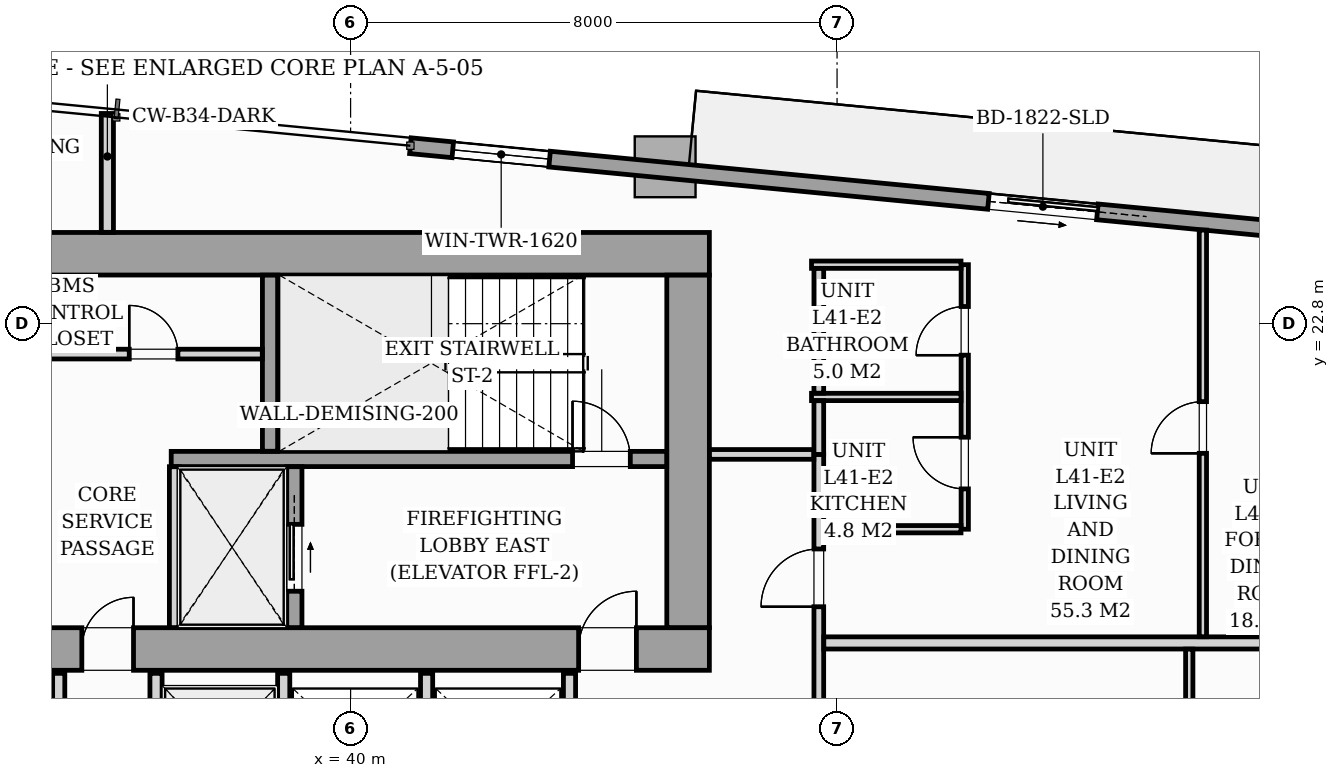
"""IFC4 building model, lengths in metres.
Left out: names, types, materials, properties, quantities, classifications, styles, units other than length and angle.
Written with IfcOpenShell. Run it as: python <this file> out.ifc"""

import sys

from ifc_helpers import new_model, si_unit, direction, frame, frame_2d, origin, origin_2d, place, context, subcontext, project, spatial, rectangle, i_section, extrude, source, transform, mapped, element, fill, save


model = new_model("IFC4")
c1 = context("Model", 3, precision=1e-05, world=origin(), true_north=direction((0.0, 1.0)))
c2 = subcontext(c1, "Body", "Model", "MODEL_VIEW")
j1 = project(units=[si_unit("LENGTHUNIT", "METRE"), si_unit("PLANEANGLEUNIT", "RADIAN")], contexts=[c1])
p1 = place(None, origin())
s1 = spatial("IfcSite", under=j1, at=p1, CompositionType="ELEMENT")
p2 = place(p1, origin())
s2 = spatial("IfcBuilding", under=s1, at=p2, CompositionType="ELEMENT")
p3 = place(p2, frame((0.0, 0.0, 143.8)))
s3 = spatial("IfcBuildingStorey", under=s2, at=p3, CompositionType="ELEMENT", Elevation=143.8)
m1 = source(origin(), c2, "Body", "SweptSolid", [
    extrude(i_section(OverallWidth=0.421, OverallDepth=0.465, WebThickness=0.045, FlangeThickness=0.073, FilletRadius=0.018, at=origin_2d()), origin(), (0.0, 0.0, 1.0), 3.196),
])
for number, where, z_axis, x_axis in (
    (1, (38.88, 17.4, 0.002), (0.0, 0.0, 1.0), (1.0, 0.0, 0.0)),
    (2, (45.6, 17.4, 0.002), (0.0, 0.0, 1.0), (1.0, 0.0, 0.0)),
    (3, (38.88, 24.0, 0.002), (0.0, 0.0, 1.0), (1.0, 0.0, 0.0)),
    (4, (45.6, 24.0, 0.002), (0.0, 0.0, 1.0), (1.0, 0.0, 0.0)),
):
    element("IfcColumn", number, at=place(p3, frame(where, z_axis=z_axis, x_axis=x_axis)), inside=s3, PredefinedType="PILASTER", context=c2, shape_type="MappedRepresentation", body=[
        mapped(m1, transform((0.0, 0.0, 0.0), scale=1.0)),
    ])
m2 = source(origin(), c2, "Body", "SweptSolid", [
    extrude(rectangle(XDim=1.0, YDim=1.0, at=origin_2d()), origin(), (0.0, 0.0, 1.0), 3.196),
])
p4 = place(p3, frame((45.173, 25.38, 0.002), z_axis=(0.0, 0.0, 1.0), x_axis=(0.995396198367, -0.09584575252, 0.0)))
e5 = element("IfcColumn", 5, at=p4, inside=s3, PredefinedType="COLUMN", context=c2, shape_type="MappedRepresentation", body=[
    mapped(m2, transform((0.0, 0.0, 0.0), scale=1.0)),
])
p5 = place(p3, frame((40.983, 25.727, 0.0), z_axis=(0.0, 0.0, 1.0), x_axis=(0.995395844771, -0.095849424686, 0.0)))
e6 = element("IfcWall", 6, at=p5, inside=s3, PredefinedType="STANDARD", context=c2, shape_type="SweptSolid", body=[
    extrude(rectangle(XDim=17.01, YDim=0.26, at=frame_2d((8.505, 0.0))), origin(), (0.0, 0.0, 1.0), 2.94),
])
p6 = place(p5, frame((9.55, 0.0, 0.0)))
e7 = element("IfcOpeningElement", 7, at=p6, cuts=e6, PredefinedType="OPENING", context=c2, shape_type="SweptSolid", body=[
    extrude(rectangle(XDim=1.8, YDim=2.06, at=frame_2d((0.9, 1.03))), frame((0.0, 0.14, 0.0), z_axis=(0.0, -1.0, 0.0), x_axis=(1.0, 0.0, 0.0)), (0.0, 0.0, 1.0), 0.28),
])
p7 = place(p5, frame((0.7, 0.0, 0.65)))
e8 = element("IfcOpeningElement", 8, at=p7, cuts=e6, PredefinedType="OPENING", context=c2, shape_type="SweptSolid", body=[
    extrude(rectangle(XDim=1.6, YDim=1.5, at=frame_2d((0.8, 0.75))), frame((0.0, 0.14, 0.0), z_axis=(0.0, -1.0, 0.0), x_axis=(1.0, 0.0, 0.0)), (0.0, 0.0, 1.0), 0.28),
])
p8 = place(p3, frame((26.1, 17.45, 0.0), z_axis=(0.0, 0.0, 1.0), x_axis=(1.0, 0.0, 0.0)))
e9 = element("IfcWall", 9, at=p8, inside=s3, PredefinedType="SHEAR", context=c2, shape_type="SweptSolid", body=[
    extrude(rectangle(XDim=19.8, YDim=0.7, at=frame_2d((9.9, 0.0))), origin(), (0.0, 0.0, 1.0), 3.2),
])
p9 = place(p8, frame((1.05, 0.0, 0.0)))
e10 = element("IfcOpeningElement", 10, at=p9, cuts=e9, PredefinedType="OPENING", context=c2, shape_type="SweptSolid", body=[
    extrude(rectangle(XDim=0.95, YDim=2.06, at=frame_2d((0.475, 1.03))), frame((0.0, 0.36, 0.0), z_axis=(0.0, -1.0, 0.0), x_axis=(1.0, 0.0, 0.0)), (0.0, 0.0, 1.0), 0.72),
])
p10 = place(p8, frame((9.48, 0.0, 0.0)))
e11 = element("IfcOpeningElement", 11, at=p10, cuts=e9, PredefinedType="OPENING", context=c2, shape_type="SweptSolid", body=[
    extrude(rectangle(XDim=0.85, YDim=2.0, at=frame_2d((0.425, 1.0))), frame((0.0, 0.36, 0.0), z_axis=(0.0, -1.0, 0.0), x_axis=(1.0, 0.0, 0.0)), (0.0, 0.0, 1.0), 0.72),
])
p11 = place(p8, frame((17.65, 0.0, 0.0)))
e12 = element("IfcOpeningElement", 12, at=p11, cuts=e9, PredefinedType="OPENING", context=c2, shape_type="SweptSolid", body=[
    extrude(rectangle(XDim=0.95, YDim=2.06, at=frame_2d((0.475, 1.03))), frame((0.0, 0.36, 0.0), z_axis=(0.0, -1.0, 0.0), x_axis=(1.0, 0.0, 0.0)), (0.0, 0.0, 1.0), 0.72),
])
p12 = place(p3, frame((26.1, 23.95, 0.0), z_axis=(0.0, 0.0, 1.0), x_axis=(1.0, 0.0, 0.0)))
e13 = element("IfcWall", 13, at=p12, inside=s3, PredefinedType="SHEAR", context=c2, shape_type="SweptSolid", body=[
    extrude(rectangle(XDim=19.8, YDim=0.7, at=frame_2d((9.9, 0.0))), origin(), (0.0, 0.0, 1.0), 3.2),
])
p13 = place(p3, frame((45.55, 17.802, 0.0), z_axis=(0.0, 0.0, 1.0), x_axis=(0.0, 1.0, 0.0)))
e14 = element("IfcWall", 14, at=p13, inside=s3, PredefinedType="SHEAR", context=c2, shape_type="SweptSolid", body=[
    extrude(rectangle(XDim=5.796, YDim=0.7, at=frame_2d((2.898, 0.0))), origin(), (0.0, 0.0, 1.0), 3.2),
])
p14 = place(p3, frame((37.05, 20.575, 0.0), z_axis=(0.0, 0.0, 1.0), x_axis=(1.0, 0.0, 0.0)))
e15 = element("IfcWall", 15, at=p14, inside=s3, PredefinedType="SOLIDWALL", context=c2, shape_type="SweptSolid", body=[
    extrude(rectangle(XDim=8.148, YDim=0.25, at=frame_2d((4.074, 0.0))), origin(), (0.0, 0.0, 1.0), 3.2),
])
p15 = place(p14, frame((6.6, 0.0, 0.0)))
e16 = element("IfcOpeningElement", 16, at=p15, cuts=e15, PredefinedType="OPENING", context=c2, shape_type="SweptSolid", body=[
    extrude(rectangle(XDim=0.95, YDim=2.06, at=frame_2d((0.475, 1.03))), frame((0.0, 0.135, 0.0), z_axis=(0.0, -1.0, 0.0), x_axis=(1.0, 0.0, 0.0)), (0.0, 0.0, 1.0), 0.27),
])
p16 = place(p3, frame((38.675, 20.702, 0.0), z_axis=(0.0, 0.0, 1.0), x_axis=(0.0, 1.0, 0.0)))
e17 = element("IfcWall", 17, at=p16, inside=s3, PredefinedType="SOLIDWALL", context=c2, shape_type="SweptSolid", body=[
    extrude(rectangle(XDim=2.896, YDim=0.25, at=frame_2d((1.448, 0.0))), origin(), (0.0, 0.0, 1.0), 3.2),
])
p17 = place(p3, frame((37.1, 17.802, 0.0), z_axis=(0.0, 0.0, 1.0), x_axis=(0.0, 1.0, 0.0)))
e18 = element("IfcWall", 18, at=p17, inside=s3, PredefinedType="PARTITIONING", context=c2, shape_type="SweptSolid", body=[
    extrude(rectangle(XDim=2.646, YDim=0.16, at=frame_2d((1.323, 0.0))), origin(), (0.0, 0.0, 1.0), 2.94),
])
p18 = place(p3, frame((39.075, 17.802, 0.0), z_axis=(0.0, 0.0, 1.0), x_axis=(0.0, 1.0, 0.0)))
e19 = element("IfcWall", 19, at=p18, inside=s3, PredefinedType="SOLIDWALL", context=c2, shape_type="SweptSolid", body=[
    extrude(rectangle(XDim=2.646, YDim=0.25, at=frame_2d((1.323, 0.0))), origin(), (0.0, 0.0, 1.0), 3.2),
])
p19 = place(p18, frame((0.598, 0.0, 0.0)))
e20 = element("IfcOpeningElement", 20, at=p19, cuts=e19, PredefinedType="OPENING", context=c2, shape_type="SweptSolid", body=[
    extrude(rectangle(XDim=1.1, YDim=2.08, at=frame_2d((0.55, 1.04))), frame((0.0, 0.135, 0.0), z_axis=(0.0, -1.0, 0.0), x_axis=(1.0, 0.0, 0.0)), (0.0, 0.0, 1.0), 0.27),
])
p20 = place(p3, frame((34.982, 22.3, 0.0), z_axis=(0.0, 0.0, 1.0), x_axis=(1.0, 0.0, 0.0)))
e21 = element("IfcWall", 21, at=p20, inside=s3, PredefinedType="PARTITIONING", context=c2, shape_type="SweptSolid", body=[
    extrude(rectangle(XDim=3.566, YDim=0.16, at=frame_2d((1.783, 0.0))), origin(), (0.0, 0.0, 1.0), 2.94),
])
p21 = place(p20, frame((1.378, 0.0, 0.0)))
e22 = element("IfcOpeningElement", 22, at=p21, cuts=e21, PredefinedType="OPENING", context=c2, shape_type="SweptSolid", body=[
    extrude(rectangle(XDim=0.8, YDim=2.05, at=frame_2d((0.4, 1.025))), frame((0.0, 0.09, 0.0), z_axis=(0.0, -1.0, 0.0), x_axis=(1.0, 0.0, 0.0)), (0.0, 0.0, 1.0), 0.18),
])
for number, where, z_axis, x_axis in (
    (23, (35.2, 14.75, 0.0), (0.0, 0.0, 1.0), (0.0, 1.0, 0.0)),
    (24, (36.8, 14.75, 0.0), (0.0, 0.0, 1.0), (0.0, 1.0, 0.0)),
    (25, (38.9, 14.75, 0.0), (0.0, 0.0, 1.0), (0.0, 1.0, 0.0)),
    (26, (41.25, 14.75, 0.0), (0.0, 0.0, 1.0), (0.0, 1.0, 0.0)),
    (27, (43.6, 14.75, 0.0), (0.0, 0.0, 1.0), (0.0, 1.0, 0.0)),
):
    element("IfcWall", number, at=place(p3, frame(where, z_axis=z_axis, x_axis=x_axis)), inside=s3, PredefinedType="PARTITIONING", context=c2, shape_type="SweptSolid", body=[
        extrude(rectangle(XDim=2.3, YDim=0.2, at=frame_2d((1.15, 0.0))), origin(), (0.0, 0.0, 1.0), 2.94),
    ])
p22 = place(p3, frame((47.7, 12.832, 0.0), z_axis=(0.0, 0.0, 1.0), x_axis=(0.0, 1.0, 0.0)))
e28 = element("IfcWall", 28, at=p22, inside=s3, PredefinedType="PARTITIONING", context=c2, shape_type="SweptSolid", body=[
    extrude(rectangle(XDim=7.818, YDim=0.16, at=frame_2d((3.909, 0.0))), origin(), (0.0, 0.0, 1.0), 2.94),
])
p23 = place(p22, frame((0.493, 0.0, 0.0)))
e29 = element("IfcOpeningElement", 29, at=p23, cuts=e28, PredefinedType="OPENING", context=c2, shape_type="SweptSolid", body=[
    extrude(rectangle(XDim=0.95, YDim=2.06, at=frame_2d((0.475, 1.03))), frame((0.0, 0.09, 0.0), z_axis=(0.0, -1.0, 0.0), x_axis=(1.0, 0.0, 0.0)), (0.0, 0.0, 1.0), 0.18),
])
p24 = place(p22, frame((5.313, 0.0, 0.0)))
e30 = element("IfcOpeningElement", 30, at=p24, cuts=e28, PredefinedType="OPENING", context=c2, shape_type="SweptSolid", body=[
    extrude(rectangle(XDim=0.95, YDim=2.06, at=frame_2d((0.475, 1.03))), frame((0.0, 0.09, 0.0), z_axis=(0.0, -1.0, 0.0), x_axis=(1.0, 0.0, 0.0)), (0.0, 0.0, 1.0), 0.18),
])
p25 = place(p3, frame((36.0, 24.302, 0.0), z_axis=(0.0, 0.0, 1.0), x_axis=(0.0, 1.0, 0.0)))
e31 = element("IfcWall", 31, at=p25, inside=s3, PredefinedType="PARTITIONING", context=c2, shape_type="SweptSolid", body=[
    extrude(rectangle(XDim=1.955, YDim=0.2, at=frame_2d((0.978, 0.0))), origin(), (0.0, 0.0, 1.0), 2.94),
])
p26 = place(p3, frame((45.902, 20.65, 0.0), z_axis=(0.0, 0.0, 1.0), x_axis=(1.0, 0.0, 0.0)))
e32 = element("IfcWall", 32, at=p26, inside=s3, PredefinedType="PARTITIONING", context=c2, shape_type="SweptSolid", body=[
    extrude(rectangle(XDim=1.716, YDim=0.16, at=frame_2d((0.858, 0.0))), origin(), (0.0, 0.0, 1.0), 2.94),
])
p27 = place(p3, frame((47.782, 17.55, 0.0), z_axis=(0.0, 0.0, 1.0), x_axis=(1.0, 0.0, 0.0)))
e33 = element("IfcWall", 33, at=p27, inside=s3, PredefinedType="PARTITIONING", context=c2, shape_type="SweptSolid", body=[
    extrude(rectangle(XDim=11.934, YDim=0.2, at=frame_2d((5.967, 0.0))), origin(), (0.0, 0.0, 1.0), 2.94),
])
p28 = place(p3, frame((53.792, 7.081, 0.0), z_axis=(0.0, 0.0, 1.0), x_axis=(0.0, 1.0, 0.0)))
e34 = element("IfcWall", 34, at=p28, inside=s3, PredefinedType="PARTITIONING", context=c2, shape_type="SweptSolid", body=[
    extrude(rectangle(XDim=10.367, YDim=0.12, at=frame_2d((5.184, 0.0))), origin(), (0.0, 0.0, 1.0), 2.94),
])
p29 = place(p28, frame((4.758, 0.0, 0.0)))
e35 = element("IfcOpeningElement", 35, at=p29, cuts=e34, PredefinedType="OPENING", context=c2, shape_type="SweptSolid", body=[
    extrude(rectangle(XDim=0.85, YDim=2.05, at=frame_2d((0.425, 1.025))), frame((0.0, 0.07, 0.0), z_axis=(0.0, -1.0, 0.0), x_axis=(1.0, 0.0, 0.0)), (0.0, 0.0, 1.0), 0.14),
])
p30 = place(p3, frame((50.1, 19.42, 0.0), z_axis=(0.0, 0.0, 1.0), x_axis=(0.0, 1.0, 0.0)))
e36 = element("IfcWall", 36, at=p30, inside=s3, PredefinedType="PARTITIONING", context=c2, shape_type="SweptSolid", body=[
    extrude(rectangle(XDim=4.35, YDim=0.12, at=frame_2d((2.175, 0.0))), origin(), (0.0, 0.0, 1.0), 2.94),
])
p31 = place(p30, frame((0.663, 0.0, 0.0)))
e37 = element("IfcOpeningElement", 37, at=p31, cuts=e36, PredefinedType="OPENING", context=c2, shape_type="SweptSolid", body=[
    extrude(rectangle(XDim=0.85, YDim=2.05, at=frame_2d((0.425, 1.025))), frame((0.0, 0.07, 0.0), z_axis=(0.0, -1.0, 0.0), x_axis=(1.0, 0.0, 0.0)), (0.0, 0.0, 1.0), 0.14),
])
p32 = place(p30, frame((2.862, 0.0, 0.0)))
e38 = element("IfcOpeningElement", 38, at=p32, cuts=e36, PredefinedType="OPENING", context=c2, shape_type="SweptSolid", body=[
    extrude(rectangle(XDim=0.8, YDim=2.02, at=frame_2d((0.4, 1.01))), frame((0.0, 0.07, 0.0), z_axis=(0.0, -1.0, 0.0), x_axis=(1.0, 0.0, 0.0)), (0.0, 0.0, 1.0), 0.14),
])
p33 = place(p3, frame((47.58, 21.595, 0.0), z_axis=(0.0, 0.0, 1.0), x_axis=(1.0, 0.0, 0.0)))
e39 = element("IfcWall", 39, at=p33, inside=s3, PredefinedType="PARTITIONING", context=c2, shape_type="SweptSolid", body=[
    extrude(rectangle(XDim=2.458, YDim=0.12, at=frame_2d((1.229, 0.0))), origin(), (0.0, 0.0, 1.0), 2.94),
])
p34 = place(p3, frame((47.782, 19.42, 0.0), z_axis=(0.0, 0.0, 1.0), x_axis=(1.0, 0.0, 0.0)))
e40 = element("IfcWall", 40, at=p34, inside=s3, PredefinedType="PARTITIONING", context=c2, shape_type="SweptSolid", body=[
    extrude(rectangle(XDim=2.256, YDim=0.12, at=frame_2d((1.128, 0.0))), origin(), (0.0, 0.0, 1.0), 2.94),
])
p35 = place(p3, frame((47.58, 23.77, 0.0), z_axis=(0.0, 0.0, 1.0), x_axis=(1.0, 0.0, 0.0)))
e41 = element("IfcWall", 41, at=p35, inside=s3, PredefinedType="PARTITIONING", context=c2, shape_type="SweptSolid", body=[
    extrude(rectangle(XDim=2.458, YDim=0.12, at=frame_2d((1.229, 0.0))), origin(), (0.0, 0.0, 1.0), 2.216),
])
p36 = place(p3, frame((47.7, 20.65, 0.0), z_axis=(0.0, 0.0, 1.0), x_axis=(0.0, 1.0, 0.0)))
e42 = element("IfcWall", 42, at=p36, inside=s3, PredefinedType="PARTITIONING", context=c2, shape_type="SweptSolid", body=[
    extrude(rectangle(XDim=0.883, YDim=0.16, at=frame_2d((0.441, 0.0))), origin(), (0.0, 0.0, 1.0), 2.94),
])
p37 = place(p3, frame((47.7, 21.657, 0.0), z_axis=(0.0, 0.0, 1.0), x_axis=(0.0, 1.0, 0.0)))
e43 = element("IfcWall", 43, at=p37, inside=s3, PredefinedType="PARTITIONING", context=c2, shape_type="SweptSolid", body=[
    extrude(rectangle(XDim=2.051, YDim=0.16, at=frame_2d((1.025, 0.0))), origin(), (0.0, 0.0, 1.0), 2.94),
])
p38 = place(p3, frame((54.016, 17.652, 0.0), z_axis=(0.0, 0.0, 1.0), x_axis=(0.0, 1.0, 0.0)))
e44 = element("IfcWall", 44, at=p38, inside=s3, PredefinedType="PARTITIONING", context=c2, shape_type="SweptSolid", body=[
    extrude(rectangle(XDim=6.687, YDim=0.12, at=frame_2d((3.344, 0.0))), origin(), (0.0, 0.0, 1.0), 2.94),
])
p39 = place(p38, frame((3.016, 0.0, 0.0)))
e45 = element("IfcOpeningElement", 45, at=p39, cuts=e44, PredefinedType="OPENING", context=c2, shape_type="SweptSolid", body=[
    extrude(rectangle(XDim=0.85, YDim=2.05, at=frame_2d((0.425, 1.025))), frame((0.0, 0.07, 0.0), z_axis=(0.0, -1.0, 0.0), x_axis=(1.0, 0.0, 0.0)), (0.0, 0.0, 1.0), 0.14),
])
m3 = source(origin(), c2, "Body", "SweptSolid", [
    extrude(rectangle(XDim=1.8, YDim=2.06, at=frame_2d((0.9, 1.03))), frame((0.0, 0.025, 0.0), z_axis=(0.0, -1.0, 0.0), x_axis=(1.0, 0.0, 0.0)), (0.0, 0.0, 1.0), 0.05),
])
p40 = place(p6, origin())
e46 = element("IfcDoor", 46, at=p40, inside=s3, OperationType="SLIDING_TO_RIGHT", PredefinedType="DOOR", context=c2, shape_type="MappedRepresentation", body=[
    mapped(m3, transform((0.0, 0.0, 0.0), scale=1.0)),
])
fill(e7, e46)
m4 = source(origin(), c2, "Body", "SweptSolid", [
    extrude(rectangle(XDim=1.6, YDim=1.5, at=frame_2d((0.8, 0.75))), frame((0.0, 0.03, 0.0), z_axis=(0.0, -1.0, 0.0), x_axis=(1.0, 0.0, 0.0)), (0.0, 0.0, 1.0), 0.06),
])
p41 = place(p7, origin())
e47 = element("IfcWindow", 47, at=p41, inside=s3, PartitioningType="SINGLE_PANEL", PredefinedType="WINDOW", context=c2, shape_type="MappedRepresentation", body=[
    mapped(m4, transform((0.0, 0.0, 0.0), scale=1.0)),
])
fill(e8, e47)
m5 = source(origin(), c2, "Body", "SweptSolid", [
    extrude(rectangle(XDim=0.85, YDim=2.0, at=frame_2d((0.425, 1.0))), frame((0.0, 0.025, 0.0), z_axis=(0.0, -1.0, 0.0), x_axis=(1.0, 0.0, 0.0)), (0.0, 0.0, 1.0), 0.05),
])
p42 = place(p10, origin())
e48 = element("IfcDoor", 48, at=p42, inside=s3, OperationType="SINGLE_SWING_RIGHT", PredefinedType="DOOR", context=c2, shape_type="MappedRepresentation", body=[
    mapped(m5, transform((0.0, 0.0, 0.0), scale=1.0)),
])
fill(e11, e48)
m6 = source(origin(), c2, "Body", "SweptSolid", [
    extrude(rectangle(XDim=0.95, YDim=2.06, at=frame_2d((0.475, 1.03))), frame((0.0, 0.025, 0.0), z_axis=(0.0, -1.0, 0.0), x_axis=(1.0, 0.0, 0.0)), (0.0, 0.0, 1.0), 0.05),
])
p43 = place(p11, origin())
e49 = element("IfcDoor", 49, at=p43, inside=s3, OperationType="SINGLE_SWING_RIGHT", PredefinedType="DOOR", context=c2, shape_type="MappedRepresentation", body=[
    mapped(m6, transform((0.0, 0.0, 0.0), scale=1.0)),
])
fill(e12, e49)
p44 = place(p15, origin())
e50 = element("IfcDoor", 50, at=p44, inside=s3, OperationType="SINGLE_SWING_LEFT", PredefinedType="DOOR", context=c2, shape_type="MappedRepresentation", body=[
    mapped(m6, transform((0.0, 0.0, 0.0), scale=1.0)),
])
fill(e16, e50)
m7 = source(origin(), c2, "Body", "SweptSolid", [
    extrude(rectangle(XDim=1.1, YDim=2.08, at=frame_2d((0.55, 1.04))), frame((0.0, 0.025, 0.0), z_axis=(0.0, -1.0, 0.0), x_axis=(1.0, 0.0, 0.0)), (0.0, 0.0, 1.0), 0.05),
])
p45 = place(p19, origin())
e51 = element("IfcDoor", 51, at=p45, inside=s3, OperationType="SLIDING_TO_RIGHT", PredefinedType="DOOR", context=c2, shape_type="MappedRepresentation", body=[
    mapped(m7, transform((0.0, 0.0, 0.0), scale=1.0)),
])
fill(e20, e51)
m8 = source(origin(), c2, "Body", "SweptSolid", [
    extrude(rectangle(XDim=0.8, YDim=2.05, at=frame_2d((0.4, 1.025))), frame((0.0, 0.025, 0.0), z_axis=(0.0, -1.0, 0.0), x_axis=(1.0, 0.0, 0.0)), (0.0, 0.0, 1.0), 0.05),
])
p46 = place(p21, origin())
e52 = element("IfcDoor", 52, at=p46, inside=s3, OperationType="SINGLE_SWING_LEFT", PredefinedType="DOOR", context=c2, shape_type="MappedRepresentation", body=[
    mapped(m8, transform((0.0, 0.0, 0.0), scale=1.0)),
])
fill(e22, e52)
m9 = source(origin(), c2, "Body", "SweptSolid", [
    extrude(rectangle(XDim=0.95, YDim=2.06, at=frame_2d((0.475, 1.03))), frame((0.0, 0.025, 0.0), z_axis=(0.0, -1.0, 0.0), x_axis=(1.0, 0.0, 0.0)), (0.0, 0.0, 1.0), 0.05),
])
p47 = place(p24, origin())
e53 = element("IfcDoor", 53, at=p47, inside=s3, OperationType="SINGLE_SWING_LEFT", PredefinedType="DOOR", context=c2, shape_type="MappedRepresentation", body=[
    mapped(m9, transform((0.0, 0.0, 0.0), scale=1.0)),
])
fill(e30, e53)
m10 = source(origin(), c2, "Body", "SweptSolid", [
    extrude(rectangle(XDim=0.85, YDim=2.05, at=frame_2d((0.425, 1.025))), frame((0.0, 0.025, 0.0), z_axis=(0.0, -1.0, 0.0), x_axis=(1.0, 0.0, 0.0)), (0.0, 0.0, 1.0), 0.05),
])
p48 = place(p31, origin())
e54 = element("IfcDoor", 54, at=p48, inside=s3, OperationType="SINGLE_SWING_RIGHT", PredefinedType="DOOR", context=c2, shape_type="MappedRepresentation", body=[
    mapped(m10, transform((0.0, 0.0, 0.0), scale=1.0)),
])
fill(e37, e54)
m11 = source(origin(), c2, "Body", "SweptSolid", [
    extrude(rectangle(XDim=0.8, YDim=2.02, at=frame_2d((0.4, 1.01))), frame((0.0, 0.025, 0.0), z_axis=(0.0, -1.0, 0.0), x_axis=(1.0, 0.0, 0.0)), (0.0, 0.0, 1.0), 0.05),
])
p49 = place(p32, origin())
e55 = element("IfcDoor", 55, at=p49, inside=s3, OperationType="SINGLE_SWING_LEFT", PredefinedType="DOOR", context=c2, shape_type="MappedRepresentation", body=[
    mapped(m11, transform((0.0, 0.0, 0.0), scale=1.0)),
])
fill(e38, e55)
p50 = place(p39, origin())
e56 = element("IfcDoor", 56, at=p50, inside=s3, OperationType="SINGLE_SWING_LEFT", PredefinedType="DOOR", context=c2, shape_type="MappedRepresentation", body=[
    mapped(m10, transform((0.0, 0.0, 0.0), scale=1.0)),
])
fill(e45, e56)
save(model, sys.argv[1])
